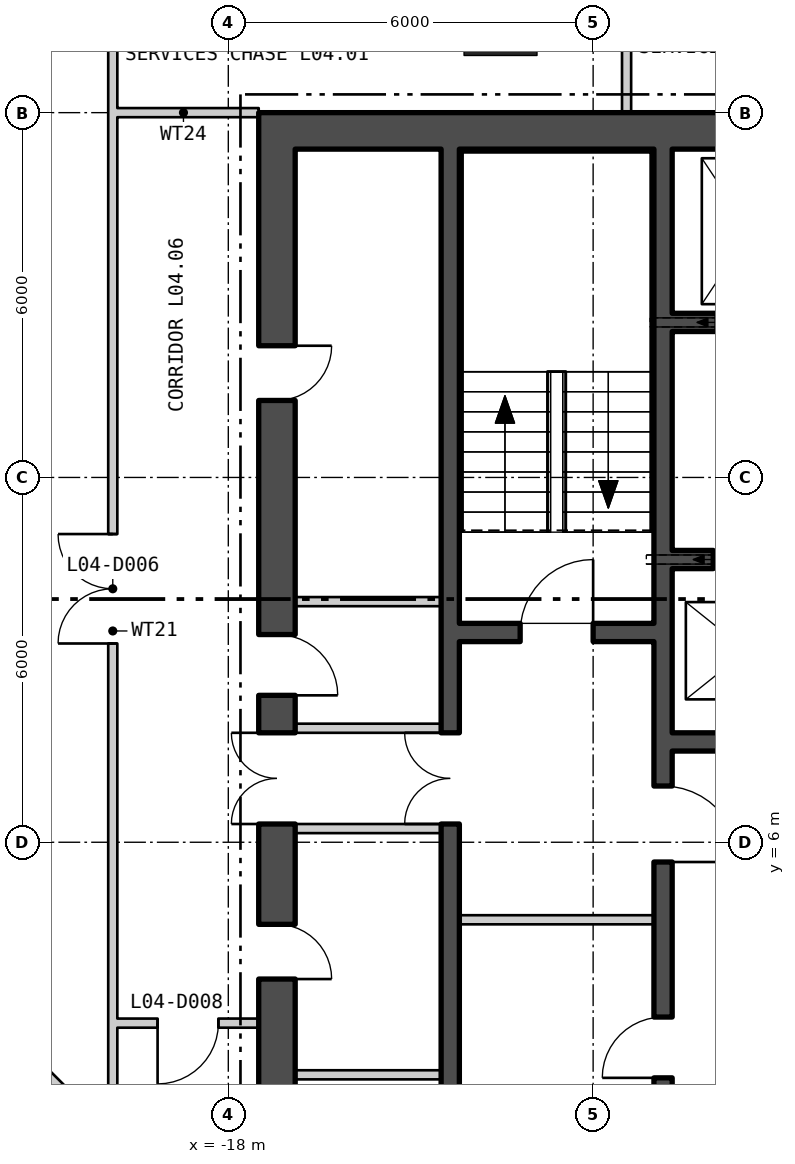
"""IFC4 building model, lengths in metres.
Left out: names, types, materials, properties, quantities, classifications, styles, units other than length and angle.
Written with IfcOpenShell. Run it as: python <this file> out.ifc"""

import sys

from ifc_helpers import new_model, si_unit, direction, frame, frame_2d, origin, origin_2d, place, context, subcontext, project, spatial, rectangle, hollow_rectangle, extrude, element, fill, save


model = new_model("IFC4")
c1 = context("Model", 3, precision=1e-05, world=origin(), true_north=direction((0.0, 1.0)))
c2 = subcontext(c1, "Body", "Model", "MODEL_VIEW")
j1 = project(units=[si_unit("LENGTHUNIT", "METRE"), si_unit("PLANEANGLEUNIT", "RADIAN")], contexts=[c1])
p1 = place(None, origin())
s1 = spatial("IfcSite", under=j1, at=p1, CompositionType="ELEMENT")
p2 = place(p1, origin())
s2 = spatial("IfcBuilding", under=s1, at=p2, CompositionType="ELEMENT")
p3 = place(p2, frame((0.0, 0.0, 23.7)))
s3 = spatial("IfcBuildingStorey", under=s2, at=p3, CompositionType="ELEMENT", Elevation=23.7)
p4 = place(p3, frame((-13.523, 19.54, 0.0), z_axis=(0.0, 0.0, 1.0), x_axis=(-1.0, 0.0, 0.0)))
e1 = element("IfcColumn", 1, at=p4, inside=s3, PredefinedType="COLUMN", context=c2, shape_type="SweptSolid", body=[
    extrude(hollow_rectangle(XDim=1.2, YDim=1.2, WallThickness=0.1, at=origin_2d()), origin(), (0.0, 0.0, 1.0), 5.1),
])
p5 = place(p3, frame((-17.5, 17.7, 0.0), z_axis=(0.0, 0.0, 1.0), x_axis=(1.0, 0.0, 0.0)))
e2 = element("IfcWall", 2, at=p5, inside=s3, PredefinedType="SHEAR", context=c2, shape_type="SweptSolid", body=[
    extrude(rectangle(XDim=35.0, YDim=0.6, at=frame_2d((17.5, 0.0))), origin(), (0.0, 0.0, 1.0), 4.85),
])
p6 = place(p3, frame((-17.2, 0.6, 0.0), z_axis=(0.0, 0.0, 1.0), x_axis=(0.0, 1.0, 0.0)))
e3 = element("IfcWall", 3, at=p6, inside=s3, PredefinedType="SHEAR", context=c2, shape_type="SweptSolid", body=[
    extrude(rectangle(XDim=16.8, YDim=0.6, at=frame_2d((8.4, 0.0))), origin(), (0.0, 0.0, 1.0), 4.85),
])
p7 = place(p6, frame((5.7, 0.0, 0.0)))
e4 = element("IfcOpeningElement", 4, at=p7, cuts=e3, PredefinedType="OPENING", context=c2, shape_type="SweptSolid", body=[
    extrude(rectangle(XDim=1.5, YDim=2.1, at=frame_2d((0.75, 1.05))), frame((0.0, 0.31, 0.0), z_axis=(0.0, -1.0, 0.0), x_axis=(1.0, 0.0, 0.0)), (0.0, 0.0, 1.0), 0.62),
])
p8 = place(p6, frame((0.4, 0.0, 0.0)))
e5 = element("IfcOpeningElement", 5, at=p8, cuts=e3, PredefinedType="OPENING", context=c2, shape_type="SweptSolid", body=[
    extrude(rectangle(XDim=0.9, YDim=2.1, at=frame_2d((0.45, 1.05))), frame((0.0, 0.31, 0.0), z_axis=(0.0, -1.0, 0.0), x_axis=(1.0, 0.0, 0.0)), (0.0, 0.0, 1.0), 0.62),
])
p9 = place(p6, frame((3.15, 0.0, 0.0)))
e6 = element("IfcOpeningElement", 6, at=p9, cuts=e3, PredefinedType="OPENING", context=c2, shape_type="SweptSolid", body=[
    extrude(rectangle(XDim=0.9, YDim=2.1, at=frame_2d((0.45, 1.05))), frame((0.0, 0.31, 0.0), z_axis=(0.0, -1.0, 0.0), x_axis=(1.0, 0.0, 0.0)), (0.0, 0.0, 1.0), 0.62),
])
p10 = place(p6, frame((7.816, 0.0, 0.0)))
e7 = element("IfcOpeningElement", 7, at=p10, cuts=e3, PredefinedType="OPENING", context=c2, shape_type="SweptSolid", body=[
    extrude(rectangle(XDim=1.0, YDim=2.1, at=frame_2d((0.5, 1.05))), frame((0.0, 0.31, 0.0), z_axis=(0.0, -1.0, 0.0), x_axis=(1.0, 0.0, 0.0)), (0.0, 0.0, 1.0), 0.62),
])
p11 = place(p6, frame((12.666, 0.0, 0.0)))
e8 = element("IfcOpeningElement", 8, at=p11, cuts=e3, PredefinedType="OPENING", context=c2, shape_type="SweptSolid", body=[
    extrude(rectangle(XDim=0.9, YDim=2.1, at=frame_2d((0.45, 1.05))), frame((0.0, 0.31, 0.0), z_axis=(0.0, -1.0, 0.0), x_axis=(1.0, 0.0, 0.0)), (0.0, 0.0, 1.0), 0.62),
])
p12 = place(p3, frame((-10.85, 0.6, 0.0), z_axis=(0.0, 0.0, 1.0), x_axis=(0.0, 1.0, 0.0)))
e9 = element("IfcWall", 9, at=p12, inside=s3, PredefinedType="SHEAR", context=c2, shape_type="SweptSolid", body=[
    extrude(rectangle(XDim=16.8, YDim=0.3, at=frame_2d((8.4, 0.0))), origin(), (0.0, 0.0, 1.0), 4.85),
])
p13 = place(p12, frame((5.075, 0.0, 0.0)))
e10 = element("IfcOpeningElement", 10, at=p13, cuts=e9, PredefinedType="OPENING", context=c2, shape_type="SweptSolid", body=[
    extrude(rectangle(XDim=1.25, YDim=2.1, at=frame_2d((0.625, 1.05))), frame((0.0, 0.16, 0.0), z_axis=(0.0, -1.0, 0.0), x_axis=(1.0, 0.0, 0.0)), (0.0, 0.0, 1.0), 0.32),
])
p14 = place(p12, frame((1.525, 0.0, 0.0)))
e11 = element("IfcOpeningElement", 11, at=p14, cuts=e9, PredefinedType="OPENING", context=c2, shape_type="SweptSolid", body=[
    extrude(rectangle(XDim=1.0, YDim=2.1, at=frame_2d((0.5, 1.05))), frame((0.0, 0.16, 0.0), z_axis=(0.0, -1.0, 0.0), x_axis=(1.0, 0.0, 0.0)), (0.0, 0.0, 1.0), 0.32),
])
p15 = place(p3, frame((-14.35, 0.6, 0.0), z_axis=(0.0, 0.0, 1.0), x_axis=(0.0, 1.0, 0.0)))
e12 = element("IfcWall", 12, at=p15, inside=s3, PredefinedType="SHEAR", context=c2, shape_type="SweptSolid", body=[
    extrude(rectangle(XDim=16.8, YDim=0.3, at=frame_2d((8.4, 0.0))), origin(), (0.0, 0.0, 1.0), 4.85),
])
p16 = place(p15, frame((5.7, 0.0, 0.0)))
e13 = element("IfcOpeningElement", 13, at=p16, cuts=e12, PredefinedType="OPENING", context=c2, shape_type="SweptSolid", body=[
    extrude(rectangle(XDim=1.5, YDim=2.1, at=frame_2d((0.75, 1.05))), frame((0.0, 0.16, 0.0), z_axis=(0.0, -1.0, 0.0), x_axis=(1.0, 0.0, 0.0)), (0.0, 0.0, 1.0), 0.32),
])
p17 = place(p3, frame((-14.2, 9.45, 0.0), z_axis=(0.0, 0.0, 1.0), x_axis=(1.0, 0.0, 0.0)))
e14 = element("IfcWall", 14, at=p17, inside=s3, PredefinedType="SHEAR", context=c2, shape_type="SweptSolid", body=[
    extrude(rectangle(XDim=3.2, YDim=0.3, at=frame_2d((1.6, 0.0))), origin(), (0.0, 0.0, 1.0), 4.85),
])
p18 = place(p17, frame((1.0, 0.0, 0.0)))
e15 = element("IfcOpeningElement", 15, at=p18, cuts=e14, PredefinedType="OPENING", context=c2, shape_type="SweptSolid", body=[
    extrude(rectangle(XDim=1.2, YDim=2.1, at=frame_2d((0.6, 1.05))), frame((0.0, 0.16, 0.0), z_axis=(0.0, -1.0, 0.0), x_axis=(1.0, 0.0, 0.0)), (0.0, 0.0, 1.0), 0.32),
])
p19 = place(p3, frame((-10.7, 14.55, 0.0), z_axis=(0.0, 0.0, 1.0), x_axis=(1.0, 0.0, 0.0)))
e16 = element("IfcWall", 16, at=p19, inside=s3, PredefinedType="SHEAR", context=c2, shape_type="SweptSolid", body=[
    extrude(rectangle(XDim=21.4, YDim=0.3, at=frame_2d((10.7, 0.0))), origin(), (0.0, 0.0, 1.0), 4.85),
])
p20 = place(p19, frame((0.738, 0.0, 0.0)))
e17 = element("IfcOpeningElement", 17, at=p20, cuts=e16, PredefinedType="OPENING", context=c2, shape_type="SweptSolid", body=[
    extrude(rectangle(XDim=1.1, YDim=2.1, at=frame_2d((0.55, 1.05))), frame((0.0, 0.16, 0.0), z_axis=(0.0, -1.0, 0.0), x_axis=(1.0, 0.0, 0.0)), (0.0, 0.0, 1.0), 0.32),
])
p21 = place(p19, frame((3.462, 0.0, 0.0)))
e18 = element("IfcOpeningElement", 18, at=p21, cuts=e16, PredefinedType="OPENING", context=c2, shape_type="SweptSolid", body=[
    extrude(rectangle(XDim=1.1, YDim=2.1, at=frame_2d((0.55, 1.05))), frame((0.0, 0.16, 0.0), z_axis=(0.0, -1.0, 0.0), x_axis=(1.0, 0.0, 0.0)), (0.0, 0.0, 1.0), 0.32),
])
p22 = place(p19, frame((6.138, 0.0, 0.0)))
e19 = element("IfcOpeningElement", 19, at=p22, cuts=e16, PredefinedType="OPENING", context=c2, shape_type="SweptSolid", body=[
    extrude(rectangle(XDim=1.1, YDim=2.1, at=frame_2d((0.55, 1.05))), frame((0.0, 0.16, 0.0), z_axis=(0.0, -1.0, 0.0), x_axis=(1.0, 0.0, 0.0)), (0.0, 0.0, 1.0), 0.32),
])
p23 = place(p19, frame((8.812, 0.0, 0.0)))
e20 = element("IfcOpeningElement", 20, at=p23, cuts=e16, PredefinedType="OPENING", context=c2, shape_type="SweptSolid", body=[
    extrude(rectangle(XDim=1.1, YDim=2.1, at=frame_2d((0.55, 1.05))), frame((0.0, 0.16, 0.0), z_axis=(0.0, -1.0, 0.0), x_axis=(1.0, 0.0, 0.0)), (0.0, 0.0, 1.0), 0.32),
])
p24 = place(p19, frame((14.162, 0.0, 0.0)))
e21 = element("IfcOpeningElement", 21, at=p24, cuts=e16, PredefinedType="OPENING", context=c2, shape_type="SweptSolid", body=[
    extrude(rectangle(XDim=1.1, YDim=2.1, at=frame_2d((0.55, 1.05))), frame((0.0, 0.16, 0.0), z_axis=(0.0, -1.0, 0.0), x_axis=(1.0, 0.0, 0.0)), (0.0, 0.0, 1.0), 0.32),
])
p25 = place(p19, frame((16.837, 0.0, 0.0)))
e22 = element("IfcOpeningElement", 22, at=p25, cuts=e16, PredefinedType="OPENING", context=c2, shape_type="SweptSolid", body=[
    extrude(rectangle(XDim=1.1, YDim=2.1, at=frame_2d((0.55, 1.05))), frame((0.0, 0.16, 0.0), z_axis=(0.0, -1.0, 0.0), x_axis=(1.0, 0.0, 0.0)), (0.0, 0.0, 1.0), 0.32),
])
p26 = place(p19, frame((19.562, 0.0, 0.0)))
e23 = element("IfcOpeningElement", 23, at=p26, cuts=e16, PredefinedType="OPENING", context=c2, shape_type="SweptSolid", body=[
    extrude(rectangle(XDim=1.1, YDim=2.1, at=frame_2d((0.55, 1.05))), frame((0.0, 0.16, 0.0), z_axis=(0.0, -1.0, 0.0), x_axis=(1.0, 0.0, 0.0)), (0.0, 0.0, 1.0), 0.32),
])
p27 = place(p3, frame((-10.7, 10.65, 0.0), z_axis=(0.0, 0.0, 1.0), x_axis=(1.0, 0.0, 0.0)))
e24 = element("IfcWall", 24, at=p27, inside=s3, PredefinedType="SHEAR", context=c2, shape_type="SweptSolid", body=[
    extrude(rectangle(XDim=10.3, YDim=0.3, at=frame_2d((5.15, 0.0))), origin(), (0.0, 0.0, 1.0), 4.85),
])
p28 = place(p27, frame((0.675, 0.0, 0.0)))
e25 = element("IfcOpeningElement", 25, at=p28, cuts=e24, PredefinedType="OPENING", context=c2, shape_type="SweptSolid", body=[
    extrude(rectangle(XDim=1.1, YDim=2.1, at=frame_2d((0.55, 1.05))), frame((0.0, 0.16, 0.0), z_axis=(0.0, -1.0, 0.0), x_axis=(1.0, 0.0, 0.0)), (0.0, 0.0, 1.0), 0.32),
])
p29 = place(p27, frame((3.275, 0.0, 0.0)))
e26 = element("IfcOpeningElement", 26, at=p29, cuts=e24, PredefinedType="OPENING", context=c2, shape_type="SweptSolid", body=[
    extrude(rectangle(XDim=1.1, YDim=2.1, at=frame_2d((0.55, 1.05))), frame((0.0, 0.16, 0.0), z_axis=(0.0, -1.0, 0.0), x_axis=(1.0, 0.0, 0.0)), (0.0, 0.0, 1.0), 0.32),
])
p30 = place(p27, frame((5.825, 0.0, 0.0)))
e27 = element("IfcOpeningElement", 27, at=p30, cuts=e24, PredefinedType="OPENING", context=c2, shape_type="SweptSolid", body=[
    extrude(rectangle(XDim=1.1, YDim=2.1, at=frame_2d((0.55, 1.05))), frame((0.0, 0.16, 0.0), z_axis=(0.0, -1.0, 0.0), x_axis=(1.0, 0.0, 0.0)), (0.0, 0.0, 1.0), 0.32),
])
p31 = place(p27, frame((8.375, 0.0, 0.0)))
e28 = element("IfcOpeningElement", 28, at=p31, cuts=e24, PredefinedType="OPENING", context=c2, shape_type="SweptSolid", body=[
    extrude(rectangle(XDim=1.1, YDim=2.1, at=frame_2d((0.55, 1.05))), frame((0.0, 0.16, 0.0), z_axis=(0.0, -1.0, 0.0), x_axis=(1.0, 0.0, 0.0)), (0.0, 0.0, 1.0), 0.32),
])
p32 = place(p3, frame((-10.7, 7.65, 0.0), z_axis=(0.0, 0.0, 1.0), x_axis=(1.0, 0.0, 0.0)))
e29 = element("IfcWall", 29, at=p32, inside=s3, PredefinedType="SHEAR", context=c2, shape_type="SweptSolid", body=[
    extrude(rectangle(XDim=10.3, YDim=0.3, at=frame_2d((5.15, 0.0))), origin(), (0.0, 0.0, 1.0), 4.85),
])
p33 = place(p3, frame((-14.2, 4.725, 0.0), z_axis=(0.0, 0.0, 1.0), x_axis=(1.0, 0.0, 0.0)))
e30 = element("IfcWall", 30, at=p33, inside=s3, PredefinedType="PARTITIONING", context=c2, shape_type="SweptSolid", body=[
    extrude(rectangle(XDim=3.2, YDim=0.15, at=frame_2d((1.6, 0.0))), origin(), (0.0, 0.0, 1.0), 4.85),
])
for number, where, z_axis, x_axis in (
    (31, (-16.9, 6.225, 0.0), (0.0, 0.0, 1.0), (1.0, 0.0, 0.0)),
    (32, (-16.9, 7.875, 0.0), (0.0, 0.0, 1.0), (1.0, 0.0, 0.0)),
    (33, (-16.9, 2.175, 0.0), (0.0, 0.0, 1.0), (1.0, 0.0, 0.0)),
    (34, (-16.9, 9.957, 0.0), (0.0, 0.0, 1.0), (1.0, 0.0, 0.0)),
):
    element("IfcWall", number, at=place(p3, frame(where, z_axis=z_axis, x_axis=x_axis)), inside=s3, PredefinedType="PARTITIONING", context=c2, shape_type="SweptSolid", body=[
        extrude(rectangle(XDim=2.4, YDim=0.15, at=frame_2d((1.2, 0.0))), origin(), (0.0, 0.0, 1.0), 4.85),
    ])
p34 = place(p3, frame((-25.392, 6.592, 0.0), z_axis=(0.0, 0.0, 1.0), x_axis=(0.707106781187, -0.707106781187, 0.0)))
e35 = element("IfcWall", 35, at=p34, inside=s3, PredefinedType="PARTITIONING", context=c2, shape_type="SweptSolid", body=[
    extrude(rectangle(XDim=7.586, YDim=0.15, at=frame_2d((3.793, 0.0))), origin(), (0.0, 0.0, 1.0), 4.85),
])
p35 = place(p3, frame((-19.975, 18.0, 0.0), z_axis=(0.0, 0.0, 1.0), x_axis=(1.0, 0.0, 0.0)))
e36 = element("IfcWall", 36, at=p35, inside=s3, PredefinedType="PARTITIONING", context=c2, shape_type="SweptSolid", body=[
    extrude(rectangle(XDim=2.475, YDim=0.15, at=frame_2d((1.238, 0.0))), origin(), (0.0, 0.0, 1.0), 4.3),
])
p36 = place(p3, frame((-19.9, 1.025, 0.0), z_axis=(0.0, 0.0, 1.0), x_axis=(0.0, 1.0, 0.0)))
e37 = element("IfcWall", 37, at=p36, inside=s3, PredefinedType="PARTITIONING", context=c2, shape_type="SweptSolid", body=[
    extrude(rectangle(XDim=16.9, YDim=0.15, at=frame_2d((8.45, 0.0))), origin(), (0.0, 0.0, 1.0), 4.85),
])
p37 = place(p36, frame((8.244, 0.0, 0.0)))
e38 = element("IfcOpeningElement", 38, at=p37, cuts=e37, PredefinedType="OPENING", context=c2, shape_type="SweptSolid", body=[
    extrude(rectangle(XDim=1.8, YDim=2.1, at=frame_2d((0.9, 1.05))), frame((0.0, 0.085, 0.0), z_axis=(0.0, -1.0, 0.0), x_axis=(1.0, 0.0, 0.0)), (0.0, 0.0, 1.0), 0.17),
])
p38 = place(p3, frame((-19.9, 18.075, 0.0), z_axis=(0.0, 0.0, 1.0), x_axis=(0.0, 1.0, 0.0)))
e39 = element("IfcWall", 39, at=p38, inside=s3, PredefinedType="PARTITIONING", context=c2, shape_type="SweptSolid", body=[
    extrude(rectangle(XDim=1.675, YDim=0.15, at=frame_2d((0.838, 0.0))), origin(), (0.0, 0.0, 1.0), 4.85),
])
p39 = place(p3, frame((-19.825, 3.025, 0.0), z_axis=(0.0, 0.0, 1.0), x_axis=(1.0, 0.0, 0.0)))
e40 = element("IfcWall", 40, at=p39, inside=s3, PredefinedType="PARTITIONING", context=c2, shape_type="SweptSolid", body=[
    extrude(rectangle(XDim=2.325, YDim=0.15, at=frame_2d((1.163, 0.0))), origin(), (0.0, 0.0, 1.0), 4.3),
])
p40 = place(p39, frame((0.662, 0.0, 0.0)))
e41 = element("IfcOpeningElement", 41, at=p40, cuts=e40, PredefinedType="OPENING", context=c2, shape_type="SweptSolid", body=[
    extrude(rectangle(XDim=1.0, YDim=2.1, at=frame_2d((0.5, 1.05))), frame((0.0, 0.085, 0.0), z_axis=(0.0, -1.0, 0.0), x_axis=(1.0, 0.0, 0.0)), (0.0, 0.0, 1.0), 0.17),
])
p41 = place(p3, frame((-11.45, 18.0, 0.0), z_axis=(0.0, 0.0, 1.0), x_axis=(0.0, 1.0, 0.0)))
e42 = element("IfcWall", 42, at=p41, inside=s3, PredefinedType="PARTITIONING", context=c2, shape_type="SweptSolid", body=[
    extrude(rectangle(XDim=1.75, YDim=0.15, at=frame_2d((0.875, 0.0))), origin(), (0.0, 0.0, 1.0), 4.85),
])
p42 = place(p28, origin())
e43 = element("IfcDoor", 43, at=p42, inside=s3, OperationType="SLIDING_TO_LEFT", PredefinedType="DOOR", context=c2, shape_type="SweptSolid", body=[
    extrude(rectangle(XDim=1.1, YDim=2.1, at=frame_2d((0.55, 1.05))), frame((0.0, 0.025, 0.0), z_axis=(0.0, -1.0, 0.0), x_axis=(1.0, 0.0, 0.0)), (0.0, 0.0, 1.0), 0.05),
])
fill(e25, e43)
p43 = place(p18, origin())
e44 = element("IfcDoor", 44, at=p43, inside=s3, OperationType="SINGLE_SWING_LEFT", PredefinedType="DOOR", context=c2, shape_type="SweptSolid", body=[
    extrude(rectangle(XDim=1.2, YDim=2.1, at=frame_2d((0.6, 1.05))), frame((0.0, 0.025, 0.0), z_axis=(0.0, -1.0, 0.0), x_axis=(1.0, 0.0, 0.0)), (0.0, 0.0, 1.0), 0.05),
])
fill(e15, e44)
p44 = place(p13, origin())
e45 = element("IfcDoor", 45, at=p44, inside=s3, OperationType="SINGLE_SWING_LEFT", PredefinedType="DOOR", context=c2, shape_type="SweptSolid", body=[
    extrude(rectangle(XDim=1.25, YDim=2.1, at=frame_2d((0.625, 1.05))), frame((0.0, 0.025, 0.0), z_axis=(0.0, -1.0, 0.0), x_axis=(1.0, 0.0, 0.0)), (0.0, 0.0, 1.0), 0.05),
])
fill(e10, e45)
p45 = place(p14, origin())
e46 = element("IfcDoor", 46, at=p45, inside=s3, OperationType="SINGLE_SWING_RIGHT", PredefinedType="DOOR", context=c2, shape_type="SweptSolid", body=[
    extrude(rectangle(XDim=1.0, YDim=2.1, at=frame_2d((0.5, 1.05))), frame((0.0, 0.025, 0.0), z_axis=(0.0, -1.0, 0.0), x_axis=(1.0, 0.0, 0.0)), (0.0, 0.0, 1.0), 0.05),
])
fill(e11, e46)
p46 = place(p16, origin())
e47 = element("IfcDoor", 47, at=p46, inside=s3, OperationType="DOUBLE_DOOR_SINGLE_SWING", PredefinedType="DOOR", context=c2, shape_type="SweptSolid", body=[
    extrude(rectangle(XDim=1.5, YDim=2.1, at=frame_2d((0.75, 1.05))), frame((0.0, 0.025, 0.0), z_axis=(0.0, -1.0, 0.0), x_axis=(1.0, 0.0, 0.0)), (0.0, 0.0, 1.0), 0.05),
])
fill(e13, e47)
p47 = place(p7, origin())
e48 = element("IfcDoor", 48, at=p47, inside=s3, OperationType="DOUBLE_DOOR_SINGLE_SWING", PredefinedType="DOOR", context=c2, shape_type="SweptSolid", body=[
    extrude(rectangle(XDim=1.5, YDim=2.1, at=frame_2d((0.75, 1.05))), frame((0.0, 0.025, 0.0), z_axis=(0.0, -1.0, 0.0), x_axis=(1.0, 0.0, 0.0)), (0.0, 0.0, 1.0), 0.05),
])
fill(e4, e48)
p48 = place(p9, origin())
e49 = element("IfcDoor", 49, at=p48, inside=s3, OperationType="SINGLE_SWING_LEFT", PredefinedType="DOOR", context=c2, shape_type="SweptSolid", body=[
    extrude(rectangle(XDim=0.9, YDim=2.1, at=frame_2d((0.45, 1.05))), frame((0.0, 0.025, 0.0), z_axis=(0.0, -1.0, 0.0), x_axis=(1.0, 0.0, 0.0)), (0.0, 0.0, 1.0), 0.05),
])
fill(e6, e49)
p49 = place(p10, origin())
e50 = element("IfcDoor", 50, at=p49, inside=s3, OperationType="SINGLE_SWING_LEFT", PredefinedType="DOOR", context=c2, shape_type="SweptSolid", body=[
    extrude(rectangle(XDim=1.0, YDim=2.1, at=frame_2d((0.5, 1.05))), frame((0.0, 0.025, 0.0), z_axis=(0.0, -1.0, 0.0), x_axis=(1.0, 0.0, 0.0)), (0.0, 0.0, 1.0), 0.05),
])
fill(e7, e50)
p50 = place(p11, origin())
e51 = element("IfcDoor", 51, at=p50, inside=s3, OperationType="SINGLE_SWING_RIGHT", PredefinedType="DOOR", context=c2, shape_type="SweptSolid", body=[
    extrude(rectangle(XDim=0.9, YDim=2.1, at=frame_2d((0.45, 1.05))), frame((0.0, 0.025, 0.0), z_axis=(0.0, -1.0, 0.0), x_axis=(1.0, 0.0, 0.0)), (0.0, 0.0, 1.0), 0.05),
])
fill(e8, e51)
p51 = place(p37, origin())
e52 = element("IfcDoor", 52, at=p51, inside=s3, OperationType="DOUBLE_DOOR_SINGLE_SWING", PredefinedType="DOOR", context=c2, shape_type="SweptSolid", body=[
    extrude(rectangle(XDim=1.8, YDim=2.1, at=frame_2d((0.9, 1.05))), frame((0.0, 0.025, 0.0), z_axis=(0.0, -1.0, 0.0), x_axis=(1.0, 0.0, 0.0)), (0.0, 0.0, 1.0), 0.05),
])
fill(e38, e52)
p52 = place(p40, origin())
e53 = element("IfcDoor", 53, at=p52, inside=s3, OperationType="SINGLE_SWING_LEFT", PredefinedType="DOOR", context=c2, shape_type="SweptSolid", body=[
    extrude(rectangle(XDim=1.0, YDim=2.1, at=frame_2d((0.5, 1.05))), frame((0.0, 0.025, 0.0), z_axis=(0.0, -1.0, 0.0), x_axis=(1.0, 0.0, 0.0)), (0.0, 0.0, 1.0), 0.05),
])
fill(e41, e53)
save(model, sys.argv[1])
